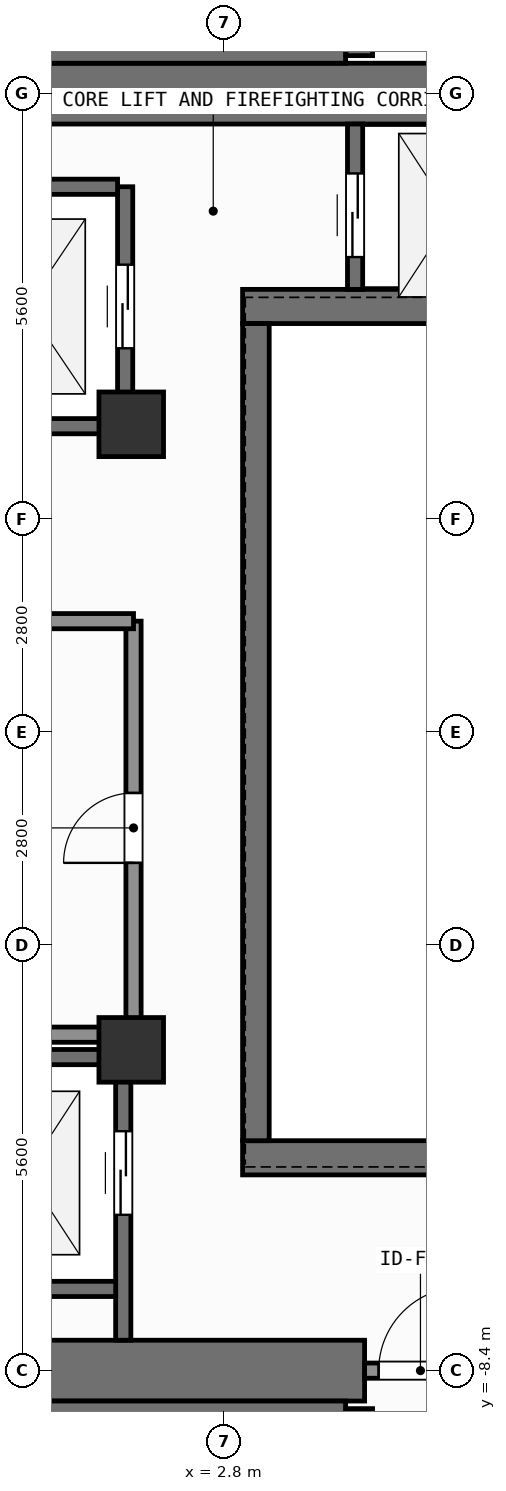
"""IFC4 building model, lengths in metres.
Left out: names, types, materials, properties, quantities, classifications, styles, units other than length and angle.
Written with IfcOpenShell. Run it as: python <this file> out.ifc"""

import sys

from ifc_helpers import new_model, si_unit, direction, frame, frame_2d, origin, origin_2d, place, context, subcontext, project, spatial, rectangle, extrude, element, fill, save


model = new_model("IFC4")
c1 = context("Model", 3, precision=1e-05, world=origin(), true_north=direction((0.0, 1.0)))
c2 = subcontext(c1, "Body", "Model", "MODEL_VIEW")
j1 = project(units=[si_unit("LENGTHUNIT", "METRE"), si_unit("PLANEANGLEUNIT", "RADIAN")], contexts=[c1])
p1 = place(None, origin())
s1 = spatial("IfcSite", under=j1, at=p1, CompositionType="ELEMENT")
p2 = place(p1, origin())
s2 = spatial("IfcBuilding", under=s1, at=p2, CompositionType="ELEMENT")
p3 = place(p2, frame((0.0, 0.0, 195.3)))
s3 = spatial("IfcBuildingStorey", under=s2, at=p3, CompositionType="ELEMENT", Elevation=195.3)
p4 = place(p3, frame((-2.62, -8.4, 0.0), z_axis=(0.0, 0.0, 1.0), x_axis=(1.0, 0.0, 0.0)))
e1 = element("IfcWall", 1, at=p4, inside=s3, PredefinedType="SHEAR", context=c2, shape_type="SweptSolid", body=[
    extrude(rectangle(XDim=7.27, YDim=0.8, at=frame_2d((3.635, 0.0))), origin(), (0.0, 0.0, 1.0), 3.9),
])
p5 = place(p3, frame((-7.55, 8.4, 0.0), z_axis=(0.0, 0.0, 1.0), x_axis=(1.0, 0.0, 0.0)))
e2 = element("IfcWall", 2, at=p5, inside=s3, PredefinedType="SHEAR", context=c2, shape_type="SweptSolid", body=[
    extrude(rectangle(XDim=16.35, YDim=0.8, at=frame_2d((8.175, 0.0))), origin(), (0.0, 0.0, 1.0), 3.9),
])
for number, where, z_axis, x_axis in (
    (3, (3.045, -5.6, 0.0), (0.0, 0.0, 1.0), (1.0, 0.0, 0.0)),
    (4, (3.045, 5.6, 0.0), (0.0, 0.0, 1.0), (1.0, 0.0, 0.0)),
):
    element("IfcWall", number, at=place(p3, frame(where, z_axis=z_axis, x_axis=x_axis)), inside=s3, PredefinedType="SHEAR", context=c2, shape_type="SweptSolid", body=[
        extrude(rectangle(XDim=5.755, YDim=0.45, at=frame_2d((2.877, 0.0))), origin(), (0.0, 0.0, 1.0), 3.9),
    ])
p6 = place(p3, frame((3.22, -5.375, 0.0), z_axis=(0.0, 0.0, 1.0), x_axis=(0.0, 1.0, 0.0)))
e5 = element("IfcWall", 5, at=p6, inside=s3, PredefinedType="SHEAR", context=c2, shape_type="SweptSolid", body=[
    extrude(rectangle(XDim=10.75, YDim=0.35, at=frame_2d((5.375, 0.0))), origin(), (0.0, 0.0, 1.0), 3.9),
])
p7 = place(p3, frame((-2.2, -8.913, 0.0), z_axis=(0.0, 0.0, 1.0), x_axis=(1.0, 0.0, 0.0)))
e6 = element("IfcWall", 6, at=p7, inside=s3, PredefinedType="SHEAR", context=c2, shape_type="SweptSolid", body=[
    extrude(rectangle(XDim=6.6, YDim=0.225, at=frame_2d((3.3, 0.0))), origin(), (0.0, 0.0, 1.0), 3.9),
])
p8 = place(p3, frame((4.58, -8.9, 0.0), z_axis=(0.0, 0.0, 1.0), x_axis=(0.0, -1.0, 0.0)))
e7 = element("IfcWall", 7, at=p8, inside=s3, PredefinedType="SHEAR", context=c2, shape_type="SweptSolid", body=[
    extrude(rectangle(XDim=2.925, YDim=0.35, at=frame_2d((1.462, 0.0))), origin(), (0.0, 0.0, 1.0), 3.9),
])
p9 = place(p8, frame((0.913, 0.0, 0.0)))
e8 = element("IfcOpeningElement", 8, at=p9, cuts=e7, PredefinedType="OPENING", context=c2, shape_type="SweptSolid", body=[
    extrude(rectangle(XDim=1.1, YDim=2.15, at=frame_2d((0.55, 1.075))), frame((0.0, 0.185, 0.0), z_axis=(0.0, -1.0, 0.0), x_axis=(1.0, 0.0, 0.0)), (0.0, 0.0, 1.0), 0.37),
])
p10 = place(p3, frame((-2.2, 8.913, 0.0), z_axis=(0.0, 0.0, 1.0), x_axis=(1.0, 0.0, 0.0)))
e9 = element("IfcWall", 9, at=p10, inside=s3, PredefinedType="SHEAR", context=c2, shape_type="SweptSolid", body=[
    extrude(rectangle(XDim=6.6, YDim=0.225, at=frame_2d((3.3, 0.0))), origin(), (0.0, 0.0, 1.0), 3.9),
])
p11 = place(p3, frame((4.58, 11.825, 0.0), z_axis=(0.0, 0.0, 1.0), x_axis=(0.0, -1.0, 0.0)))
e10 = element("IfcWall", 10, at=p11, inside=s3, PredefinedType="SHEAR", context=c2, shape_type="SweptSolid", body=[
    extrude(rectangle(XDim=2.925, YDim=0.35, at=frame_2d((1.462, 0.0))), origin(), (0.0, 0.0, 1.0), 3.9),
])
p12 = place(p11, frame((0.913, 0.0, 0.0)))
e11 = element("IfcOpeningElement", 11, at=p12, cuts=e10, PredefinedType="OPENING", context=c2, shape_type="SweptSolid", body=[
    extrude(rectangle(XDim=1.1, YDim=2.15, at=frame_2d((0.55, 1.075))), frame((0.0, 0.185, 0.0), z_axis=(0.0, -1.0, 0.0), x_axis=(1.0, 0.0, 0.0)), (0.0, 0.0, 1.0), 0.37),
])
for number, where, z_axis, x_axis in (
    (12, (1.58, -4.18, 0.0), (0.0, 0.0, 1.0), (1.0, 0.0, 0.0)),
    (13, (1.58, 4.05, 0.0), (0.0, 0.0, 1.0), (1.0, 0.0, 0.0)),
):
    element("IfcColumn", number, at=place(p3, frame(where, z_axis=z_axis, x_axis=x_axis)), inside=s3, PredefinedType="COLUMN", context=c2, shape_type="SweptSolid", body=[
        extrude(rectangle(XDim=0.85, YDim=0.85, at=origin_2d()), origin(), (0.0, 0.0, 1.0), 3.9),
    ])
p13 = place(p3, frame((1.5, 4.025, 0.0), z_axis=(0.0, 0.0, 1.0), x_axis=(0.0, 1.0, 0.0)))
e14 = element("IfcWall", 14, at=p13, inside=s3, PredefinedType="SHEAR", context=c2, shape_type="SweptSolid", body=[
    extrude(rectangle(XDim=3.15, YDim=0.2, at=frame_2d((1.575, 0.0))), origin(), (0.0, 0.0, 1.0), 3.68),
])
p14 = place(p13, frame((1.025, 0.0, 0.0)))
e15 = element("IfcOpeningElement", 15, at=p14, cuts=e14, PredefinedType="OPENING", context=c2, shape_type="SweptSolid", body=[
    extrude(rectangle(XDim=1.1, YDim=2.2, at=frame_2d((0.55, 1.1))), frame((0.0, 0.11, 0.0), z_axis=(0.0, -1.0, 0.0), x_axis=(1.0, 0.0, 0.0)), (0.0, 0.0, 1.0), 0.22),
])
for number, where, z_axis, x_axis in (
    (16, (-1.0, 4.025, 0.0), (0.0, 0.0, 1.0), (1.0, 0.0, 0.0)),
    (17, (-1.0, 7.175, 0.0), (0.0, 0.0, 1.0), (1.0, 0.0, 0.0)),
):
    element("IfcWall", number, at=place(p3, frame(where, z_axis=z_axis, x_axis=x_axis)), inside=s3, PredefinedType="SHEAR", context=c2, shape_type="SweptSolid", body=[
        extrude(rectangle(XDim=2.4, YDim=0.2, at=frame_2d((1.2, 0.0))), origin(), (0.0, 0.0, 1.0), 3.68),
    ])
p15 = place(p3, frame((1.475, -8.0, 0.0), z_axis=(0.0, 0.0, 1.0), x_axis=(0.0, 1.0, 0.0)))
e18 = element("IfcWall", 18, at=p15, inside=s3, PredefinedType="SHEAR", context=c2, shape_type="SweptSolid", body=[
    extrude(rectangle(XDim=3.725, YDim=0.2, at=frame_2d((1.863, 0.0))), origin(), (0.0, 0.0, 1.0), 3.68),
])
p16 = place(p15, frame((1.65, 0.0, 0.0)))
e19 = element("IfcOpeningElement", 19, at=p16, cuts=e18, PredefinedType="OPENING", context=c2, shape_type="SweptSolid", body=[
    extrude(rectangle(XDim=1.1, YDim=2.2, at=frame_2d((0.55, 1.1))), frame((0.0, 0.11, 0.0), z_axis=(0.0, -1.0, 0.0), x_axis=(1.0, 0.0, 0.0)), (0.0, 0.0, 1.0), 0.22),
])
for number, where, z_axis, x_axis in (
    (20, (-0.975, -7.325, 0.0), (0.0, 0.0, 1.0), (1.0, 0.0, 0.0)),
    (21, (-0.975, -4.275, 0.0), (0.0, 0.0, 1.0), (1.0, 0.0, 0.0)),
):
    element("IfcWall", number, at=place(p3, frame(where, z_axis=z_axis, x_axis=x_axis)), inside=s3, PredefinedType="SHEAR", context=c2, shape_type="SweptSolid", body=[
        extrude(rectangle(XDim=2.35, YDim=0.2, at=frame_2d((1.175, 0.0))), origin(), (0.0, 0.0, 1.0), 3.68),
    ])
p17 = place(p3, frame((4.525, 5.825, 0.0), z_axis=(0.0, 0.0, 1.0), x_axis=(0.0, 1.0, 0.0)))
e22 = element("IfcWall", 22, at=p17, inside=s3, PredefinedType="SHEAR", context=c2, shape_type="SweptSolid", body=[
    extrude(rectangle(XDim=2.175, YDim=0.2, at=frame_2d((1.087, 0.0))), origin(), (0.0, 0.0, 1.0), 3.68),
])
p18 = place(p17, frame((0.425, 0.0, 0.0)))
e23 = element("IfcOpeningElement", 23, at=p18, cuts=e22, PredefinedType="OPENING", context=c2, shape_type="SweptSolid", body=[
    extrude(rectangle(XDim=1.1, YDim=2.2, at=frame_2d((0.55, 1.1))), frame((0.0, 0.11, 0.0), z_axis=(0.0, -1.0, 0.0), x_axis=(1.0, 0.0, 0.0)), (0.0, 0.0, 1.0), 0.22),
])
p19 = place(p3, frame((4.65, -8.4, 0.0), z_axis=(0.0, 0.0, 1.0), x_axis=(1.0, 0.0, 0.0)))
e24 = element("IfcWall", 24, at=p19, inside=s3, PredefinedType="SOLIDWALL", context=c2, shape_type="SweptSolid", body=[
    extrude(rectangle(XDim=1.47, YDim=0.2, at=frame_2d((0.735, 0.0))), origin(), (0.0, 0.0, 1.0), 2.82),
])
p20 = place(p19, frame((0.185, 0.0, 0.0)))
e25 = element("IfcOpeningElement", 25, at=p20, cuts=e24, PredefinedType="OPENING", context=c2, shape_type="SweptSolid", body=[
    extrude(rectangle(XDim=1.1, YDim=2.15, at=frame_2d((0.55, 1.075))), frame((0.0, 0.11, 0.0), z_axis=(0.0, -1.0, 0.0), x_axis=(1.0, 0.0, 0.0)), (0.0, 0.0, 1.0), 0.22),
])
p21 = place(p3, frame((1.61, -3.98, 0.0), z_axis=(0.0, 0.0, 1.0), x_axis=(0.0, 1.0, 0.0)))
e26 = element("IfcWall", 26, at=p21, inside=s3, PredefinedType="SOLIDWALL", context=c2, shape_type="SweptSolid", body=[
    extrude(rectangle(XDim=5.44, YDim=0.2, at=frame_2d((2.72, 0.0))), origin(), (0.0, 0.0, 1.0), 3.68),
])
p22 = place(p21, frame((2.26, 0.0, 0.0)))
e27 = element("IfcOpeningElement", 27, at=p22, cuts=e26, PredefinedType="OPENING", context=c2, shape_type="SweptSolid", body=[
    extrude(rectangle(XDim=0.92, YDim=2.1, at=frame_2d((0.46, 1.05))), frame((0.0, 0.11, 0.0), z_axis=(0.0, -1.0, 0.0), x_axis=(1.0, 0.0, 0.0)), (0.0, 0.0, 1.0), 0.22),
])
for number, where, z_axis, x_axis in (
    (28, (-1.58, -3.98, 0.0), (0.0, 0.0, 1.0), (1.0, 0.0, 0.0)),
    (29, (-1.58, 1.46, 0.0), (0.0, 0.0, 1.0), (1.0, 0.0, 0.0)),
):
    element("IfcWall", number, at=place(p3, frame(where, z_axis=z_axis, x_axis=x_axis)), inside=s3, PredefinedType="SOLIDWALL", context=c2, shape_type="SweptSolid", body=[
        extrude(rectangle(XDim=3.19, YDim=0.2, at=frame_2d((1.595, 0.0))), origin(), (0.0, 0.0, 1.0), 3.68),
    ])
p23 = place(p14, origin())
e30 = element("IfcDoor", 30, at=p23, inside=s3, OperationType="SLIDING_TO_LEFT", PredefinedType="DOOR", context=c2, shape_type="SweptSolid", body=[
    extrude(rectangle(XDim=1.1, YDim=2.2, at=frame_2d((0.55, 1.1))), frame((0.0, 0.025, 0.0), z_axis=(0.0, -1.0, 0.0), x_axis=(1.0, 0.0, 0.0)), (0.0, 0.0, 1.0), 0.05),
])
fill(e15, e30)
p24 = place(p16, origin())
e31 = element("IfcDoor", 31, at=p24, inside=s3, OperationType="SLIDING_TO_LEFT", PredefinedType="DOOR", context=c2, shape_type="SweptSolid", body=[
    extrude(rectangle(XDim=1.1, YDim=2.2, at=frame_2d((0.55, 1.1))), frame((0.0, 0.025, 0.0), z_axis=(0.0, -1.0, 0.0), x_axis=(1.0, 0.0, 0.0)), (0.0, 0.0, 1.0), 0.05),
])
fill(e19, e31)
p25 = place(p18, origin())
e32 = element("IfcDoor", 32, at=p25, inside=s3, OperationType="SLIDING_TO_LEFT", PredefinedType="DOOR", context=c2, shape_type="SweptSolid", body=[
    extrude(rectangle(XDim=1.1, YDim=2.2, at=frame_2d((0.55, 1.1))), frame((0.0, 0.025, 0.0), z_axis=(0.0, -1.0, 0.0), x_axis=(1.0, 0.0, 0.0)), (0.0, 0.0, 1.0), 0.05),
])
fill(e23, e32)
p26 = place(p20, origin())
e33 = element("IfcDoor", 33, at=p26, inside=s3, OperationType="SINGLE_SWING_RIGHT", PredefinedType="DOOR", context=c2, shape_type="SweptSolid", body=[
    extrude(rectangle(XDim=1.1, YDim=2.15, at=frame_2d((0.55, 1.075))), frame((0.0, 0.025, 0.0), z_axis=(0.0, -1.0, 0.0), x_axis=(1.0, 0.0, 0.0)), (0.0, 0.0, 1.0), 0.05),
])
fill(e25, e33)
p27 = place(p22, origin())
e34 = element("IfcDoor", 34, at=p27, inside=s3, OperationType="SINGLE_SWING_LEFT", PredefinedType="DOOR", context=c2, shape_type="SweptSolid", body=[
    extrude(rectangle(XDim=0.92, YDim=2.1, at=frame_2d((0.46, 1.05))), frame((0.0, 0.025, 0.0), z_axis=(0.0, -1.0, 0.0), x_axis=(1.0, 0.0, 0.0)), (0.0, 0.0, 1.0), 0.05),
])
fill(e27, e34)
save(model, sys.argv[1])
